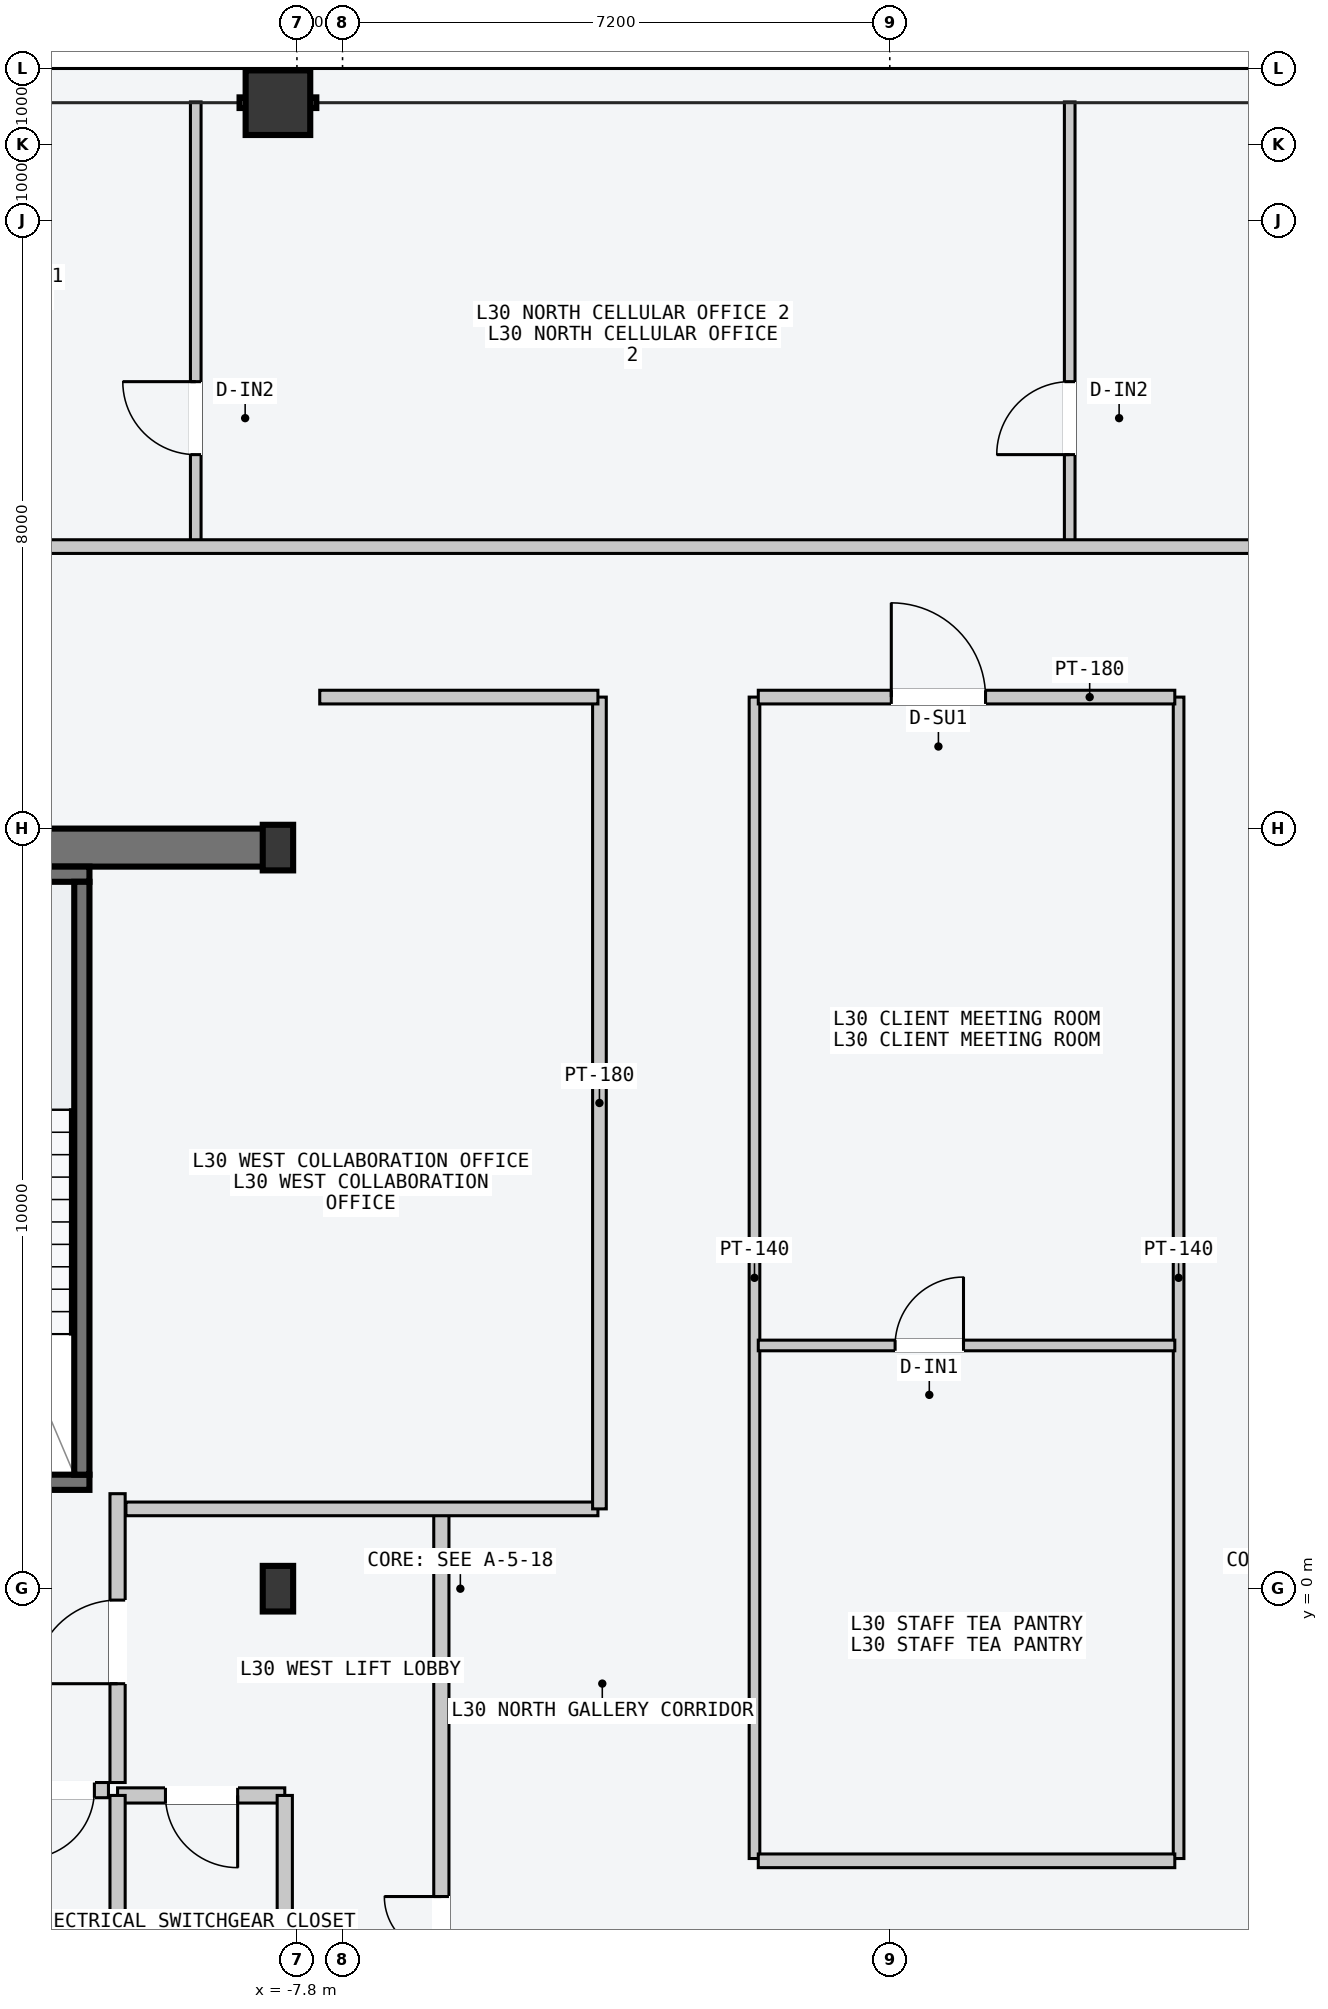
"""IFC4 building model, lengths in metres.
Left out: names, types, materials, properties, quantities, classifications, styles, units other than length and angle.
Written with IfcOpenShell. Run it as: python <this file> out.ifc"""

import sys

from ifc_helpers import new_model, si_unit, direction, frame, frame_2d, origin, origin_2d, place, context, subcontext, project, spatial, rectangle, hollow_rectangle, i_section, extrude, element, fill, save


model = new_model("IFC4")
c1 = context("Model", 3, precision=1e-05, world=origin(), true_north=direction((0.0, 1.0)))
c2 = subcontext(c1, "Body", "Model", "MODEL_VIEW")
j1 = project(units=[si_unit("LENGTHUNIT", "METRE"), si_unit("PLANEANGLEUNIT", "RADIAN")], contexts=[c1])
p1 = place(None, origin())
s1 = spatial("IfcSite", under=j1, at=p1, CompositionType="ELEMENT")
p2 = place(p1, origin())
s2 = spatial("IfcBuilding", under=s1, at=p2, CompositionType="ELEMENT")
p3 = place(p2, frame((0.0, 0.0, 117.0)))
s3 = spatial("IfcBuildingStorey", under=s2, at=p3, CompositionType="ELEMENT", Elevation=117.0)
p4 = place(p3, frame((-14.53, 9.75, -0.2), z_axis=(0.0, 0.0, 1.0), x_axis=(1.0, 0.0, 0.0)))
e1 = element("IfcWall", 1, at=p4, inside=s3, PredefinedType="SHEAR", context=c2, shape_type="SweptSolid", body=[
    extrude(rectangle(XDim=6.46, YDim=0.5, at=frame_2d((3.23, 0.0))), origin(), (0.0, 0.0, 1.0), 3.6),
])
p5 = place(p3, frame((-14.25, 1.4, -0.2), z_axis=(0.0, 0.0, 1.0), x_axis=(1.0, 0.0, 0.0)))
e2 = element("IfcWall", 2, at=p5, inside=s3, PredefinedType="SOLIDWALL", context=c2, shape_type="SweptSolid", body=[
    extrude(rectangle(XDim=3.72, YDim=0.2, at=frame_2d((1.86, 0.0))), origin(), (0.0, 0.0, 1.0), 3.6),
])
p6 = place(p5, frame((1.5, 0.0, 0.2)))
e3 = element("IfcOpeningElement", 3, at=p6, cuts=e2, PredefinedType="OPENING", context=c2, shape_type="SweptSolid", body=[
    extrude(rectangle(XDim=1.12, YDim=2.18, at=frame_2d((0.56, 1.09))), frame((0.0, 0.11, 0.0), z_axis=(0.0, -1.0, 0.0), x_axis=(1.0, 0.0, 0.0)), (0.0, 0.0, 1.0), 0.22),
])
p7 = place(p3, frame((-14.25, 9.4, -0.2), z_axis=(0.0, 0.0, 1.0), x_axis=(1.0, 0.0, 0.0)))
e4 = element("IfcWall", 4, at=p7, inside=s3, PredefinedType="SOLIDWALL", context=c2, shape_type="SweptSolid", body=[
    extrude(rectangle(XDim=3.72, YDim=0.2, at=frame_2d((1.86, 0.0))), origin(), (0.0, 0.0, 1.0), 3.6),
])
p8 = place(p3, frame((-10.63, 1.5, -0.2), z_axis=(0.0, 0.0, 1.0), x_axis=(0.0, 1.0, 0.0)))
e5 = element("IfcWall", 5, at=p8, inside=s3, PredefinedType="SOLIDWALL", context=c2, shape_type="SweptSolid", body=[
    extrude(rectangle(XDim=7.8, YDim=0.2, at=frame_2d((3.9, 0.0))), origin(), (0.0, 0.0, 1.0), 3.6),
])
for number, where, z_axis, x_axis in (
    (6, (-8.05, 0.0, 0.0), (0.0, 0.0, 1.0), (1.0, 0.0, 0.0)),
    (7, (-8.05, 9.75, 0.0), (0.0, 0.0, 1.0), (1.0, 0.0, 0.0)),
):
    element("IfcColumn", number, at=place(p3, frame(where, z_axis=z_axis, x_axis=x_axis)), inside=s3, PredefinedType="COLUMN", context=c2, shape_type="SweptSolid", body=[
        extrude(i_section(OverallWidth=0.4, OverallDepth=0.6, WebThickness=0.022, FlangeThickness=0.036, at=origin_2d()), origin(), (0.0, 0.0, 1.0), 3.6),
    ])
p9 = place(p3, frame((-8.05, 19.55, 0.0), z_axis=(0.0, 0.0, 1.0), x_axis=(1.0, 0.0, 0.0)))
e8 = element("IfcColumn", 8, at=p9, inside=s3, PredefinedType="COLUMN", context=c2, shape_type="SweptSolid", body=[
    extrude(hollow_rectangle(XDim=0.85, YDim=0.85, WallThickness=0.04, at=origin_2d()), origin(), (0.0, 0.0, 1.0), 3.6),
])
p10 = place(p3, frame((-5.9, -9.45, 0.0), z_axis=(0.0, 0.0, 1.0), x_axis=(0.0, 1.0, 0.0)))
e9 = element("IfcWall", 9, at=p10, inside=s3, PredefinedType="PARTITIONING", context=c2, shape_type="SweptSolid", body=[
    extrude(rectangle(XDim=10.5, YDim=0.2, at=frame_2d((5.25, 0.0))), origin(), (0.0, 0.0, 1.0), 3.4),
])
p11 = place(p10, frame((3.9, 0.0, 0.0)))
e10 = element("IfcOpeningElement", 10, at=p11, cuts=e9, PredefinedType="OPENING", context=c2, shape_type="SweptSolid", body=[
    extrude(rectangle(XDim=1.5, YDim=2.2, at=frame_2d((0.75, 1.1))), frame((0.0, 0.11, 0.0), z_axis=(0.0, -1.0, 0.0), x_axis=(1.0, 0.0, 0.0)), (0.0, 0.0, 1.0), 0.22),
])
p12 = place(p3, frame((-10.16, -2.55, 0.0), z_axis=(0.0, 0.0, 1.0), x_axis=(0.0, 1.0, 0.0)))
e11 = element("IfcWall", 11, at=p12, inside=s3, PredefinedType="PARTITIONING", context=c2, shape_type="SweptSolid", body=[
    extrude(rectangle(XDim=3.8, YDim=0.2, at=frame_2d((1.9, 0.0))), origin(), (0.0, 0.0, 1.0), 3.4),
])
p13 = place(p12, frame((1.3, 0.0, 0.0)))
e12 = element("IfcOpeningElement", 12, at=p13, cuts=e11, PredefinedType="OPENING", context=c2, shape_type="SweptSolid", body=[
    extrude(rectangle(XDim=1.1, YDim=2.15, at=frame_2d((0.55, 1.075))), frame((0.0, 0.11, 0.0), z_axis=(0.0, -1.0, 0.0), x_axis=(1.0, 0.0, 0.0)), (0.0, 0.0, 1.0), 0.22),
])
p14 = place(p3, frame((-10.28, -2.65, 0.0), z_axis=(0.0, 0.0, 1.0), x_axis=(-1.0, 0.0, 0.0)))
e13 = element("IfcWall", 13, at=p14, inside=s3, PredefinedType="PARTITIONING", context=c2, shape_type="SweptSolid", body=[
    extrude(rectangle(XDim=1.27, YDim=0.2, at=frame_2d((0.635, 0.0))), origin(), (0.0, 0.0, 1.0), 3.4),
])
p15 = place(p14, frame((0.185, 0.0, 0.0)))
e14 = element("IfcOpeningElement", 14, at=p15, cuts=e13, PredefinedType="OPENING", context=c2, shape_type="SweptSolid", body=[
    extrude(rectangle(XDim=0.9, YDim=2.15, at=frame_2d((0.45, 1.075))), frame((0.0, 0.11, 0.0), z_axis=(0.0, -1.0, 0.0), x_axis=(1.0, 0.0, 0.0)), (0.0, 0.0, 1.0), 0.22),
])
p16 = place(p3, frame((-7.96, -2.72, 0.0), z_axis=(0.0, 0.0, 1.0), x_axis=(-1.0, 0.0, 0.0)))
e15 = element("IfcWall", 15, at=p16, inside=s3, PredefinedType="PARTITIONING", context=c2, shape_type="SweptSolid", body=[
    extrude(rectangle(XDim=2.2, YDim=0.2, at=frame_2d((1.1, 0.0))), origin(), (0.0, 0.0, 1.0), 3.4),
])
p17 = place(p16, frame((0.62, 0.0, 0.0)))
e16 = element("IfcOpeningElement", 16, at=p17, cuts=e15, PredefinedType="OPENING", context=c2, shape_type="SweptSolid", body=[
    extrude(rectangle(XDim=0.95, YDim=2.1, at=frame_2d((0.475, 1.05))), frame((0.0, 0.11, 0.0), z_axis=(0.0, -1.0, 0.0), x_axis=(1.0, 0.0, 0.0)), (0.0, 0.0, 1.0), 0.22),
])
for number, where, z_axis, x_axis in (
    (17, (-7.96, -5.16, 0.0), (0.0, 0.0, 1.0), (0.0, 1.0, 0.0)),
    (18, (-10.16, -5.16, 0.0), (0.0, 0.0, 1.0), (0.0, 1.0, 0.0)),
):
    element("IfcWall", number, at=place(p3, frame(where, z_axis=z_axis, x_axis=x_axis)), inside=s3, PredefinedType="PARTITIONING", context=c2, shape_type="SweptSolid", body=[
        extrude(rectangle(XDim=2.44, YDim=0.2, at=frame_2d((1.22, 0.0))), origin(), (0.0, 0.0, 1.0), 3.4),
    ])
p18 = place(p3, frame((-10.05, 1.05, 0.0), z_axis=(0.0, 0.0, 1.0), x_axis=(1.0, 0.0, 0.0)))
e19 = element("IfcWall", 19, at=p18, inside=s3, PredefinedType="PARTITIONING", context=c2, shape_type="SweptSolid", body=[
    extrude(rectangle(XDim=6.21, YDim=0.18, at=frame_2d((3.105, 0.0))), origin(), (0.0, 0.0, 1.0), 3.4),
])
p19 = place(p3, frame((-3.82, 1.05, 0.0), z_axis=(0.0, 0.0, 1.0), x_axis=(0.0, 1.0, 0.0)))
e20 = element("IfcWall", 20, at=p19, inside=s3, PredefinedType="PARTITIONING", context=c2, shape_type="SweptSolid", body=[
    extrude(rectangle(XDim=10.68, YDim=0.18, at=frame_2d((5.34, 0.0))), origin(), (0.0, 0.0, 1.0), 1.74),
])
p20 = place(p3, frame((-7.5, 11.73, 0.0), z_axis=(0.0, 0.0, 1.0), x_axis=(1.0, 0.0, 0.0)))
e21 = element("IfcWall", 21, at=p20, inside=s3, PredefinedType="PARTITIONING", context=c2, shape_type="SweptSolid", body=[
    extrude(rectangle(XDim=3.66, YDim=0.18, at=frame_2d((1.83, 0.0))), origin(), (0.0, 0.0, 1.0), 3.4),
])
for number, where, z_axis, x_axis in (
    (22, (-1.78, -3.55, 0.0), (0.0, 0.0, 1.0), (0.0, 1.0, 0.0)),
    (23, (3.8, -3.55, 0.0), (0.0, 0.0, 1.0), (0.0, 1.0, 0.0)),
):
    element("IfcWall", number, at=place(p3, frame(where, z_axis=z_axis, x_axis=x_axis)), inside=s3, PredefinedType="PARTITIONING", context=c2, shape_type="SweptSolid", body=[
        extrude(rectangle(XDim=15.28, YDim=0.14, at=frame_2d((7.64, 0.0))), origin(), (0.0, 0.0, 1.0), 3.4),
    ])
p21 = place(p3, frame((-1.73, -3.58, 0.0), z_axis=(0.0, 0.0, 1.0), x_axis=(1.0, 0.0, 0.0)))
e24 = element("IfcWall", 24, at=p21, inside=s3, PredefinedType="PARTITIONING", context=c2, shape_type="SweptSolid", body=[
    extrude(rectangle(XDim=5.48, YDim=0.18, at=frame_2d((2.74, 0.0))), origin(), (0.0, 0.0, 1.0), 3.4),
])
p22 = place(p3, frame((-1.73, 3.2, 0.0), z_axis=(0.0, 0.0, 1.0), x_axis=(1.0, 0.0, 0.0)))
e25 = element("IfcWall", 25, at=p22, inside=s3, PredefinedType="PARTITIONING", context=c2, shape_type="SweptSolid", body=[
    extrude(rectangle(XDim=5.48, YDim=0.14, at=frame_2d((2.74, 0.0))), origin(), (0.0, 0.0, 1.0), 3.4),
])
p23 = place(p22, frame((1.8, 0.0, 0.0)))
e26 = element("IfcOpeningElement", 26, at=p23, cuts=e25, PredefinedType="OPENING", context=c2, shape_type="SweptSolid", body=[
    extrude(rectangle(XDim=0.9, YDim=2.15, at=frame_2d((0.45, 1.075))), frame((0.0, 0.08, 0.0), z_axis=(0.0, -1.0, 0.0), x_axis=(1.0, 0.0, 0.0)), (0.0, 0.0, 1.0), 0.16),
])
p24 = place(p3, frame((-1.73, 11.73, 0.0), z_axis=(0.0, 0.0, 1.0), x_axis=(1.0, 0.0, 0.0)))
e27 = element("IfcWall", 27, at=p24, inside=s3, PredefinedType="PARTITIONING", context=c2, shape_type="SweptSolid", body=[
    extrude(rectangle(XDim=5.48, YDim=0.18, at=frame_2d((2.74, 0.0))), origin(), (0.0, 0.0, 1.0), 3.4),
])
p25 = place(p24, frame((1.75, 0.0, 0.0)))
e28 = element("IfcOpeningElement", 28, at=p25, cuts=e27, PredefinedType="OPENING", context=c2, shape_type="SweptSolid", body=[
    extrude(rectangle(XDim=1.24, YDim=2.24, at=frame_2d((0.62, 1.12))), frame((0.0, 0.1, 0.0), z_axis=(0.0, -1.0, 0.0), x_axis=(1.0, 0.0, 0.0)), (0.0, 0.0, 1.0), 0.2),
])
p26 = place(p3, frame((-9.131, 13.77, 0.0), z_axis=(0.0, 0.0, 1.0), x_axis=(0.0, 1.0, 0.0)))
e29 = element("IfcWall", 29, at=p26, inside=s3, PredefinedType="PARTITIONING", context=c2, shape_type="SweptSolid", body=[
    extrude(rectangle(XDim=5.79, YDim=0.14, at=frame_2d((2.895, 0.0))), origin(), (0.0, 0.0, 1.0), 3.4),
])
p27 = place(p26, frame((1.15, 0.0, 0.0)))
e30 = element("IfcOpeningElement", 30, at=p27, cuts=e29, PredefinedType="OPENING", context=c2, shape_type="SweptSolid", body=[
    extrude(rectangle(XDim=0.96, YDim=2.18, at=frame_2d((0.48, 1.09))), frame((0.0, 0.08, 0.0), z_axis=(0.0, -1.0, 0.0), x_axis=(1.0, 0.0, 0.0)), (0.0, 0.0, 1.0), 0.16),
])
p28 = place(p3, frame((2.367, 13.77, 0.0), z_axis=(0.0, 0.0, 1.0), x_axis=(0.0, 1.0, 0.0)))
e31 = element("IfcWall", 31, at=p28, inside=s3, PredefinedType="PARTITIONING", context=c2, shape_type="SweptSolid", body=[
    extrude(rectangle(XDim=5.79, YDim=0.14, at=frame_2d((2.895, 0.0))), origin(), (0.0, 0.0, 1.0), 3.4),
])
p29 = place(p28, frame((1.15, 0.0, 0.0)))
e32 = element("IfcOpeningElement", 32, at=p29, cuts=e31, PredefinedType="OPENING", context=c2, shape_type="SweptSolid", body=[
    extrude(rectangle(XDim=0.96, YDim=2.18, at=frame_2d((0.48, 1.09))), frame((0.0, 0.08, 0.0), z_axis=(0.0, -1.0, 0.0), x_axis=(1.0, 0.0, 0.0)), (0.0, 0.0, 1.0), 0.16),
])
p30 = place(p3, frame((-16.1, 13.71, 0.0), z_axis=(0.0, 0.0, 1.0), x_axis=(1.0, 0.0, 0.0)))
e33 = element("IfcWall", 33, at=p30, inside=s3, PredefinedType="PARTITIONING", context=c2, shape_type="SweptSolid", body=[
    extrude(rectangle(XDim=32.2, YDim=0.18, at=frame_2d((16.1, 0.0))), origin(), (0.0, 0.0, 1.0), 3.4),
])
p31 = place(p30, frame((2.974, 0.0, 0.0)))
e34 = element("IfcOpeningElement", 34, at=p31, cuts=e33, PredefinedType="OPENING", context=c2, shape_type="SweptSolid", body=[
    extrude(rectangle(XDim=1.02, YDim=2.2, at=frame_2d((0.51, 1.1))), frame((0.0, 0.1, 0.0), z_axis=(0.0, -1.0, 0.0), x_axis=(1.0, 0.0, 0.0)), (0.0, 0.0, 1.0), 0.2),
])
p32 = place(p30, frame((0.3, 0.0, 0.0)))
e35 = element("IfcOpeningElement", 35, at=p32, cuts=e33, PredefinedType="OPENING", context=c2, shape_type="SweptSolid", body=[
    extrude(rectangle(XDim=1.06, YDim=2.2, at=frame_2d((0.53, 1.1))), frame((0.0, 0.1, 0.0), z_axis=(0.0, -1.0, 0.0), x_axis=(1.0, 0.0, 0.0)), (0.0, 0.0, 1.0), 0.2),
])
p33 = place(p30, frame((24.714, 0.0, 0.0)))
e36 = element("IfcOpeningElement", 36, at=p33, cuts=e33, PredefinedType="OPENING", context=c2, shape_type="SweptSolid", body=[
    extrude(rectangle(XDim=1.24, YDim=2.24, at=frame_2d((0.62, 1.12))), frame((0.0, 0.1, 0.0), z_axis=(0.0, -1.0, 0.0), x_axis=(1.0, 0.0, 0.0)), (0.0, 0.0, 1.0), 0.2),
])
p34 = place(p11, origin())
e37 = element("IfcDoor", 37, at=p34, inside=s3, OperationType="DOUBLE_DOOR_SINGLE_SWING", PredefinedType="DOOR", context=c2, shape_type="SweptSolid", body=[
    extrude(rectangle(XDim=1.5, YDim=2.2, at=frame_2d((0.75, 1.1))), frame((0.0, 0.025, 0.0), z_axis=(0.0, -1.0, 0.0), x_axis=(1.0, 0.0, 0.0)), (0.0, 0.0, 1.0), 0.05),
])
fill(e10, e37)
p35 = place(p13, origin())
e38 = element("IfcDoor", 38, at=p35, inside=s3, OperationType="SINGLE_SWING_LEFT", PredefinedType="DOOR", context=c2, shape_type="SweptSolid", body=[
    extrude(rectangle(XDim=1.1, YDim=2.15, at=frame_2d((0.55, 1.075))), frame((0.0, 0.025, 0.0), z_axis=(0.0, -1.0, 0.0), x_axis=(1.0, 0.0, 0.0)), (0.0, 0.0, 1.0), 0.05),
])
fill(e12, e38)
p36 = place(p15, origin())
e39 = element("IfcDoor", 39, at=p36, inside=s3, OperationType="SINGLE_SWING_RIGHT", PredefinedType="DOOR", context=c2, shape_type="SweptSolid", body=[
    extrude(rectangle(XDim=0.9, YDim=2.15, at=frame_2d((0.45, 1.075))), frame((0.0, 0.025, 0.0), z_axis=(0.0, -1.0, 0.0), x_axis=(1.0, 0.0, 0.0)), (0.0, 0.0, 1.0), 0.05),
])
fill(e14, e39)
p37 = place(p17, origin())
e40 = element("IfcDoor", 40, at=p37, inside=s3, OperationType="SINGLE_SWING_LEFT", PredefinedType="DOOR", context=c2, shape_type="SweptSolid", body=[
    extrude(rectangle(XDim=0.95, YDim=2.1, at=frame_2d((0.475, 1.05))), frame((0.0, 0.025, 0.0), z_axis=(0.0, -1.0, 0.0), x_axis=(1.0, 0.0, 0.0)), (0.0, 0.0, 1.0), 0.05),
])
fill(e16, e40)
p38 = place(p23, origin())
e41 = element("IfcDoor", 41, at=p38, inside=s3, OperationType="SINGLE_SWING_RIGHT", PredefinedType="DOOR", context=c2, shape_type="SweptSolid", body=[
    extrude(rectangle(XDim=0.9, YDim=2.15, at=frame_2d((0.45, 1.075))), frame((0.0, 0.025, 0.0), z_axis=(0.0, -1.0, 0.0), x_axis=(1.0, 0.0, 0.0)), (0.0, 0.0, 1.0), 0.05),
])
fill(e26, e41)
p39 = place(p25, origin())
e42 = element("IfcDoor", 42, at=p39, inside=s3, OperationType="SINGLE_SWING_LEFT", PredefinedType="DOOR", context=c2, shape_type="SweptSolid", body=[
    extrude(rectangle(XDim=1.24, YDim=2.24, at=frame_2d((0.62, 1.12))), frame((0.0, 0.025, 0.0), z_axis=(0.0, -1.0, 0.0), x_axis=(1.0, 0.0, 0.0)), (0.0, 0.0, 1.0), 0.05),
])
fill(e28, e42)
p40 = place(p27, origin())
e43 = element("IfcDoor", 43, at=p40, inside=s3, OperationType="SINGLE_SWING_RIGHT", PredefinedType="DOOR", context=c2, shape_type="SweptSolid", body=[
    extrude(rectangle(XDim=0.96, YDim=2.18, at=frame_2d((0.48, 1.09))), frame((0.0, 0.025, 0.0), z_axis=(0.0, -1.0, 0.0), x_axis=(1.0, 0.0, 0.0)), (0.0, 0.0, 1.0), 0.05),
])
fill(e30, e43)
p41 = place(p29, origin())
e44 = element("IfcDoor", 44, at=p41, inside=s3, OperationType="SINGLE_SWING_LEFT", PredefinedType="DOOR", context=c2, shape_type="SweptSolid", body=[
    extrude(rectangle(XDim=0.96, YDim=2.18, at=frame_2d((0.48, 1.09))), frame((0.0, 0.025, 0.0), z_axis=(0.0, -1.0, 0.0), x_axis=(1.0, 0.0, 0.0)), (0.0, 0.0, 1.0), 0.05),
])
fill(e32, e44)
save(model, sys.argv[1])
